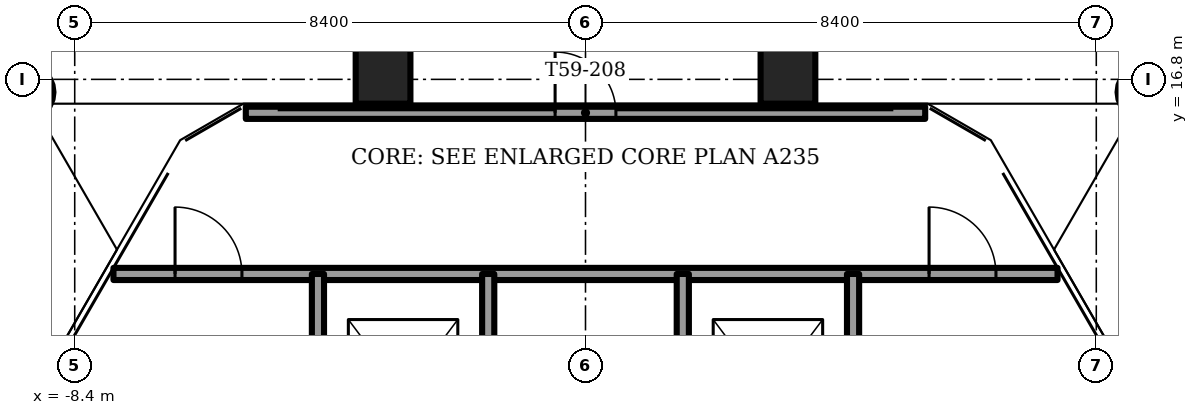
"""IFC4 building model, lengths in metres.
Left out: names, types, materials, properties, quantities, classifications, styles, units other than length and angle.
Written with IfcOpenShell. Run it as: python <this file> out.ifc"""

import sys

from ifc_helpers import new_model, si_unit, direction, frame, frame_2d, origin, origin_2d, place, context, subcontext, project, spatial, rectangle, circle, extrude, element, fill, save


model = new_model("IFC4")
c1 = context("Model", 3, precision=1e-05, world=origin(), true_north=direction((0.0, 1.0)))
c2 = subcontext(c1, "Body", "Model", "MODEL_VIEW")
j1 = project(units=[si_unit("LENGTHUNIT", "METRE"), si_unit("PLANEANGLEUNIT", "RADIAN")], contexts=[c1])
p1 = place(None, origin())
s1 = spatial("IfcSite", under=j1, at=p1, CompositionType="ELEMENT")
p2 = place(p1, origin())
s2 = spatial("IfcBuilding", under=s1, at=p2, CompositionType="ELEMENT")
p3 = place(p2, frame((0.0, 0.0, 237.0)))
s3 = spatial("IfcBuildingStorey", under=s2, at=p3, CompositionType="ELEMENT", Elevation=237.0)
for number, where, z_axis, x_axis in (
    (1, (-9.2, 16.589, -1.2), (0.0, 0.0, 1.0), (1.0, 0.0, 0.0)),
    (2, (9.2, 16.589, -1.2), (0.0, 0.0, 1.0), (1.0, 0.0, 0.0)),
):
    element("IfcColumn", number, at=place(p3, frame(where, z_axis=z_axis, x_axis=x_axis)), inside=s3, PredefinedType="COLUMN", context=c2, shape_type="SweptSolid", body=[
        extrude(circle(Radius=0.45, at=origin_2d()), origin(), (0.0, 0.0, 1.0), 8.0),
    ])
for number, where, z_axis, x_axis in (
    (3, (3.329, 16.85, -1.2), (0.0, 0.0, 1.0), (1.0, 0.0, 0.0)),
    (4, (-3.329, 16.85, -1.2), (0.0, 0.0, 1.0), (1.0, 0.0, 0.0)),
):
    element("IfcColumn", number, at=place(p3, frame(where, z_axis=z_axis, x_axis=x_axis)), inside=s3, PredefinedType="COLUMN", context=c2, shape_type="SweptSolid", body=[
        extrude(rectangle(XDim=0.9, YDim=0.9, at=origin_2d()), origin(), (0.0, 0.0, 1.0), 8.0),
    ])
p4 = place(p3, frame((-7.763, 13.6, 0.0), z_axis=(0.0, 0.0, 1.0), x_axis=(1.0, 0.0, 0.0)))
e5 = element("IfcWall", 5, at=p4, inside=s3, PredefinedType="PARTITIONING", context=c2, shape_type="SweptSolid", body=[
    extrude(rectangle(XDim=15.525, YDim=0.2, at=frame_2d((7.763, 0.0))), origin(), (0.0, 0.0, 1.0), 7.7),
])
p5 = place(p4, frame((1.013, 0.0, 0.0)))
e6 = element("IfcOpeningElement", 6, at=p5, cuts=e5, PredefinedType="OPENING", context=c2, shape_type="SweptSolid", body=[
    extrude(rectangle(XDim=1.1, YDim=2.1, at=frame_2d((0.55, 1.05))), frame((0.0, 0.1, 0.0), z_axis=(0.0, -1.0, 0.0), x_axis=(1.0, 0.0, 0.0)), (0.0, 0.0, 1.0), 0.2),
])
p6 = place(p4, frame((13.413, 0.0, 0.0)))
e7 = element("IfcOpeningElement", 7, at=p6, cuts=e5, PredefinedType="OPENING", context=c2, shape_type="SweptSolid", body=[
    extrude(rectangle(XDim=1.1, YDim=2.1, at=frame_2d((0.55, 1.05))), frame((0.0, 0.1, 0.0), z_axis=(0.0, -1.0, 0.0), x_axis=(1.0, 0.0, 0.0)), (0.0, 0.0, 1.0), 0.2),
])
p7 = place(p3, frame((-4.4, 9.7, 0.0), z_axis=(0.0, 0.0, 1.0), x_axis=(0.0, 1.0, 0.0)))
e8 = element("IfcWall", 8, at=p7, inside=s3, PredefinedType="PARTITIONING", context=c2, shape_type="SweptSolid", body=[
    extrude(rectangle(XDim=3.9, YDim=0.2, at=frame_2d((1.95, 0.0))), origin(), (0.0, 0.0, 1.0), 7.7),
])
p8 = place(p7, frame((1.35, 0.0, 0.0)))
e9 = element("IfcOpeningElement", 9, at=p8, cuts=e8, PredefinedType="OPENING", context=c2, shape_type="SweptSolid", body=[
    extrude(rectangle(XDim=1.2, YDim=2.1, at=frame_2d((0.6, 1.05))), frame((0.0, 0.1, 0.0), z_axis=(0.0, -1.0, 0.0), x_axis=(1.0, 0.0, 0.0)), (0.0, 0.0, 1.0), 0.2),
])
p9 = place(p3, frame((4.4, 9.7, 0.0), z_axis=(0.0, 0.0, 1.0), x_axis=(0.0, 1.0, 0.0)))
e10 = element("IfcWall", 10, at=p9, inside=s3, PredefinedType="PARTITIONING", context=c2, shape_type="SweptSolid", body=[
    extrude(rectangle(XDim=3.9, YDim=0.2, at=frame_2d((1.95, 0.0))), origin(), (0.0, 0.0, 1.0), 7.7),
])
p10 = place(p9, frame((1.35, 0.0, 0.0)))
e11 = element("IfcOpeningElement", 11, at=p10, cuts=e10, PredefinedType="OPENING", context=c2, shape_type="SweptSolid", body=[
    extrude(rectangle(XDim=1.2, YDim=2.1, at=frame_2d((0.6, 1.05))), frame((0.0, 0.1, 0.0), z_axis=(0.0, -1.0, 0.0), x_axis=(1.0, 0.0, 0.0)), (0.0, 0.0, 1.0), 0.2),
])
for number, where, z_axis, x_axis in (
    (12, (-1.6, 9.7, 0.0), (0.0, 0.0, 1.0), (0.0, 1.0, 0.0)),
    (13, (1.6, 9.7, 0.0), (0.0, 0.0, 1.0), (0.0, 1.0, 0.0)),
):
    element("IfcWall", number, at=place(p3, frame(where, z_axis=z_axis, x_axis=x_axis)), inside=s3, PredefinedType="PARTITIONING", context=c2, shape_type="SweptSolid", body=[
        extrude(rectangle(XDim=3.9, YDim=0.2, at=frame_2d((1.95, 0.0))), origin(), (0.0, 0.0, 1.0), 7.7),
    ])
p11 = place(p3, frame((-5.586, 16.25, 0.0), z_axis=(0.0, 0.0, 1.0), x_axis=(1.0, 0.0, 0.0)))
e14 = element("IfcWall", 14, at=p11, inside=s3, PredefinedType="PARTITIONING", context=c2, shape_type="SweptSolid", body=[
    extrude(rectangle(XDim=11.172, YDim=0.2, at=frame_2d((5.586, 0.0))), origin(), (0.0, 0.0, 1.0), 7.7),
])
p12 = place(p11, frame((5.086, 0.0, 0.0)))
e15 = element("IfcOpeningElement", 15, at=p12, cuts=e14, PredefinedType="OPENING", context=c2, shape_type="SweptSolid", body=[
    extrude(rectangle(XDim=1.0, YDim=2.1, at=frame_2d((0.5, 1.05))), frame((0.0, 0.1, 0.0), z_axis=(0.0, -1.0, 0.0), x_axis=(1.0, 0.0, 0.0)), (0.0, 0.0, 1.0), 0.2),
])
p13 = place(p12, origin())
e16 = element("IfcDoor", 16, at=p13, inside=s3, OperationType="SINGLE_SWING_LEFT", PredefinedType="DOOR", context=c2, shape_type="SweptSolid", body=[
    extrude(rectangle(XDim=1.0, YDim=2.1, at=frame_2d((0.5, 1.05))), frame((0.0, 0.025, 0.0), z_axis=(0.0, -1.0, 0.0), x_axis=(1.0, 0.0, 0.0)), (0.0, 0.0, 1.0), 0.05),
])
fill(e15, e16)
p14 = place(p5, origin())
e17 = element("IfcDoor", 17, at=p14, inside=s3, OperationType="SINGLE_SWING_LEFT", PredefinedType="DOOR", context=c2, shape_type="SweptSolid", body=[
    extrude(rectangle(XDim=1.1, YDim=2.1, at=frame_2d((0.55, 1.05))), frame((0.0, 0.025, 0.0), z_axis=(0.0, -1.0, 0.0), x_axis=(1.0, 0.0, 0.0)), (0.0, 0.0, 1.0), 0.05),
])
fill(e6, e17)
p15 = place(p6, origin())
e18 = element("IfcDoor", 18, at=p15, inside=s3, OperationType="SINGLE_SWING_RIGHT", PredefinedType="DOOR", context=c2, shape_type="SweptSolid", body=[
    extrude(rectangle(XDim=1.1, YDim=2.1, at=frame_2d((0.55, 1.05))), frame((0.0, 0.025, 0.0), z_axis=(0.0, -1.0, 0.0), x_axis=(1.0, 0.0, 0.0)), (0.0, 0.0, 1.0), 0.05),
])
fill(e7, e18)
save(model, sys.argv[1])
